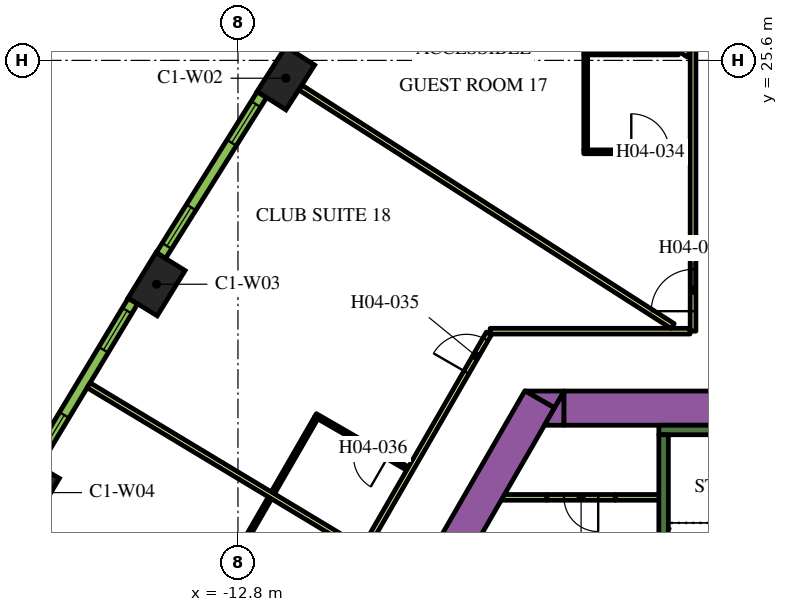
"""IFC4 building model, lengths in metres.
Left out: names, types, materials, properties, quantities, classifications, styles, units other than length and angle.
Written with IfcOpenShell. Run it as: python <this file> out.ifc"""

import sys

from ifc_helpers import new_model, si_unit, direction, frame, frame_2d, origin, origin_2d, place, context, subcontext, project, spatial, polyline, rectangle, outline, extrude, element, fill, save


model = new_model("IFC4")
c1 = context("Model", 3, precision=1e-05, world=origin(), true_north=direction((0.0, 1.0)))
c2 = subcontext(c1, "Body", "Model", "MODEL_VIEW")
j1 = project(units=[si_unit("LENGTHUNIT", "METRE"), si_unit("PLANEANGLEUNIT", "RADIAN")], contexts=[c1])
p1 = place(None, origin())
s1 = spatial("IfcSite", under=j1, at=p1, CompositionType="ELEMENT")
p2 = place(p1, origin())
s2 = spatial("IfcBuilding", under=s1, at=p2, CompositionType="ELEMENT")
p3 = place(p2, frame((0.0, 0.0, 70.5)))
s3 = spatial("IfcBuildingStorey", under=s2, at=p3, CompositionType="ELEMENT", Elevation=70.5)
for number, where, z_axis, x_axis in (
    (1, (-11.539, 25.131, 0.0), (0.0, 0.0, 1.0), (-0.539, -0.842, 0.0)),
    (2, (-14.942, 19.71, 0.0), (0.0, 0.0, 1.0), (-0.524, -0.852, 0.0)),
    (3, (-18.243, 14.228, 0.0), (0.0, 0.0, 1.0), (-0.508, -0.861, 0.0)),
):
    element("IfcColumn", number, at=place(p3, frame(where, z_axis=z_axis, x_axis=x_axis)), inside=s3, PredefinedType="COLUMN", context=c2, shape_type="SweptSolid", body=[
        extrude(rectangle(XDim=1.4, YDim=0.9, at=origin_2d()), origin(), (0.0, 0.0, 1.0), 3.9),
    ])
p4 = place(p3, frame((-15.36, -1.503, 0.0), z_axis=(0.0, 0.0, 1.0), x_axis=(0.50000389221, 0.866023156604, 0.0)))
e4 = element("IfcWall", 4, at=p4, inside=s3, PredefinedType="SOLIDWALL", context=c2, shape_type="SweptSolid", body=[
    extrude(rectangle(XDim=21.0, YDim=0.9, at=frame_2d((10.5, 0.0))), origin(), (0.0, 0.0, 1.0), 3.9),
])
p5 = place(p3, origin())
e5 = element("IfcWall", 5, at=p5, inside=s3, PredefinedType="SOLIDWALL", context=c2, shape_type="SweptSolid", body=[
    extrude(outline(polyline([(-4.215, 16.9), (-4.469, 16.46), (-5.231, 16.9), (-4.215, 16.9)])), origin(), (0.0, 0.0, 1.0), 3.9),
])
p6 = place(p3, frame((-4.224, 16.45, 0.0), z_axis=(0.0, 0.0, 1.0), x_axis=(1.0, 0.0, 0.0)))
e6 = element("IfcWall", 6, at=p6, inside=s3, PredefinedType="SOLIDWALL", context=c2, shape_type="SweptSolid", body=[
    extrude(rectangle(XDim=9.488, YDim=0.9, at=frame_2d((4.744, 0.0))), origin(), (0.0, 0.0, 1.0), 3.9),
])
e7 = element("IfcWall", 7, at=p5, inside=s3, PredefinedType="SOLIDWALL", context=c2, shape_type="SweptSolid", body=[
    extrude(outline(polyline([(-4.734, 16.0), (-4.226, 16.88), (-4.226, 16.0), (-4.734, 16.0)])), origin(), (0.0, 0.0, 1.0), 3.9),
])
p7 = place(p3, frame((-1.725, 15.875, 0.0), z_axis=(0.0, 0.0, 1.0), x_axis=(1.0, 0.0, 0.0)))
e8 = element("IfcWall", 8, at=p7, inside=s3, PredefinedType="SOLIDWALL", context=c2, shape_type="SweptSolid", body=[
    extrude(rectangle(XDim=3.45, YDim=0.25, at=frame_2d((1.725, 0.0))), origin(), (0.0, 0.0, 1.0), 3.9),
])
p8 = place(p3, frame((-1.6, 8.7, 0.0), z_axis=(0.0, 0.0, 1.0), x_axis=(0.0, 1.0, 0.0)))
e9 = element("IfcWall", 9, at=p8, inside=s3, PredefinedType="SOLIDWALL", context=c2, shape_type="SweptSolid", body=[
    extrude(rectangle(XDim=7.05, YDim=0.25, at=frame_2d((3.525, 0.0))), origin(), (0.0, 0.0, 1.0), 3.9),
])
p9 = place(p3, frame((-5.851, 14.102, 0.0), z_axis=(0.0, 0.0, 1.0), x_axis=(1.0, 0.0, 0.0)))
e10 = element("IfcWall", 10, at=p9, inside=s3, PredefinedType="PARTITIONING", context=c2, shape_type="SweptSolid", body=[
    extrude(rectangle(XDim=1.18, YDim=0.15, at=frame_2d((0.59, 0.0))), origin(), (0.0, 0.0, 1.0), 2.75),
])
p10 = place(p3, frame((-2.871, 14.102, 0.0), z_axis=(0.0, 0.0, 1.0), x_axis=(1.0, 0.0, 0.0)))
e11 = element("IfcWall", 11, at=p10, inside=s3, PredefinedType="PARTITIONING", context=c2, shape_type="SweptSolid", body=[
    extrude(rectangle(XDim=1.196, YDim=0.15, at=frame_2d((0.598, 0.0))), origin(), (0.0, 0.0, 1.0), 2.75),
])
p11 = place(p3, frame((-2.871, 14.102, 0.0), z_axis=(0.0, 0.0, 1.0), x_axis=(-1.0, 0.0, 0.0)))
e12 = element("IfcWall", 12, at=p11, inside=s3, PredefinedType="PARTITIONING", context=c2, shape_type="SweptSolid", body=[
    extrude(rectangle(XDim=1.8, YDim=0.15, at=frame_2d((0.9, 0.0))), origin(), (0.0, 0.0, 1.0), 2.75),
])
p12 = place(p11, frame((0.45, 0.0, 0.0)))
e13 = element("IfcOpeningElement", 13, at=p12, cuts=e12, PredefinedType="OPENING", context=c2, shape_type="SweptSolid", body=[
    extrude(rectangle(XDim=0.9, YDim=2.1, at=frame_2d((0.45, 1.05))), frame((0.0, 0.085, 0.0), z_axis=(0.0, -1.0, 0.0), x_axis=(1.0, 0.0, 0.0)), (0.0, 0.0, 1.0), 0.17),
])
p13 = place(p3, frame((-0.825, 18.475, 0.0), z_axis=(0.0, 0.0, 1.0), x_axis=(0.0, 1.0, 0.0)))
e14 = element("IfcWall", 14, at=p13, inside=s3, PredefinedType="PARTITIONING", context=c2, shape_type="SweptSolid", body=[
    extrude(rectangle(XDim=16.224, YDim=0.15, at=frame_2d((8.112, 0.0))), origin(), (0.0, 0.0, 1.0), 2.75),
])
p14 = place(p13, frame((7.949, 0.0, 0.0)))
e15 = element("IfcOpeningElement", 15, at=p14, cuts=e14, PredefinedType="OPENING", context=c2, shape_type="SweptSolid", body=[
    extrude(rectangle(XDim=1.0, YDim=2.1, at=frame_2d((0.5, 1.05))), frame((0.0, 0.085, 0.0), z_axis=(0.0, -1.0, 0.0), x_axis=(1.0, 0.0, 0.0)), (0.0, 0.0, 1.0), 0.17),
])
p15 = place(p13, frame((0.526, 0.0, 0.0)))
e16 = element("IfcOpeningElement", 16, at=p15, cuts=e14, PredefinedType="OPENING", context=c2, shape_type="SweptSolid", body=[
    extrude(rectangle(XDim=1.1, YDim=2.1, at=frame_2d((0.55, 1.05))), frame((0.0, 0.085, 0.0), z_axis=(0.0, -1.0, 0.0), x_axis=(1.0, 0.0, 0.0)), (0.0, 0.0, 1.0), 0.17),
])
p16 = place(p3, frame((-6.163, 18.475, 0.0), z_axis=(0.0, 0.0, 1.0), x_axis=(1.0, 0.0, 0.0)))
e17 = element("IfcWall", 17, at=p16, inside=s3, PredefinedType="PARTITIONING", context=c2, shape_type="SweptSolid", body=[
    extrude(rectangle(XDim=5.258, YDim=0.15, at=frame_2d((2.629, 0.0))), origin(), (0.0, 0.0, 1.0), 2.75),
])
p17 = place(p3, frame((-19.081, -3.9, 0.0), z_axis=(0.0, 0.0, 1.0), x_axis=(0.499998313975, 0.866026377209, 0.0)))
e18 = element("IfcWall", 18, at=p17, inside=s3, PredefinedType="PARTITIONING", context=c2, shape_type="SweptSolid", body=[
    extrude(rectangle(XDim=25.766, YDim=0.15, at=frame_2d((12.883, 0.0))), origin(), (0.0, 0.0, 1.0), 2.75),
])
p18 = place(p17, frame((24.586, 0.0, 0.0)))
e19 = element("IfcOpeningElement", 19, at=p18, cuts=e18, PredefinedType="OPENING", context=c2, shape_type="SweptSolid", body=[
    extrude(rectangle(XDim=1.0, YDim=2.1, at=frame_2d((0.5, 1.05))), frame((0.0, 0.085, 0.0), z_axis=(0.0, -1.0, 0.0), x_axis=(1.0, 0.0, 0.0)), (0.0, 0.0, 1.0), 0.17),
])
p19 = place(p17, frame((9.948, 0.0, 0.0)))
e20 = element("IfcOpeningElement", 20, at=p19, cuts=e18, PredefinedType="OPENING", context=c2, shape_type="SweptSolid", body=[
    extrude(rectangle(XDim=1.0, YDim=2.1, at=frame_2d((0.5, 1.05))), frame((0.0, 0.085, 0.0), z_axis=(0.0, -1.0, 0.0), x_axis=(1.0, 0.0, 0.0)), (0.0, 0.0, 1.0), 0.17),
])
p20 = place(p17, frame((7.782, 0.0, 0.0)))
e21 = element("IfcOpeningElement", 21, at=p20, cuts=e18, PredefinedType="OPENING", context=c2, shape_type="SweptSolid", body=[
    extrude(rectangle(XDim=0.9, YDim=2.1, at=frame_2d((0.45, 1.05))), frame((0.0, 0.085, 0.0), z_axis=(0.0, -1.0, 0.0), x_axis=(1.0, 0.0, 0.0)), (0.0, 0.0, 1.0), 0.17),
])
p21 = place(p17, frame((4.658, 0.0, 0.0)))
e22 = element("IfcOpeningElement", 22, at=p21, cuts=e18, PredefinedType="OPENING", context=c2, shape_type="SweptSolid", body=[
    extrude(rectangle(XDim=0.9, YDim=2.1, at=frame_2d((0.45, 1.05))), frame((0.0, 0.085, 0.0), z_axis=(0.0, -1.0, 0.0), x_axis=(1.0, 0.0, 0.0)), (0.0, 0.0, 1.0), 0.17),
])
p22 = place(p3, frame((-16.729, 17.052, 0.0), z_axis=(0.0, 0.0, 1.0), x_axis=(0.856630606266, -0.515930232113, 0.0)))
e23 = element("IfcWall", 23, at=p22, inside=s3, PredefinedType="PARTITIONING", context=c2, shape_type="SweptSolid", body=[
    extrude(rectangle(XDim=8.355, YDim=0.15, at=frame_2d((4.178, 0.0))), origin(), (0.0, 0.0, 1.0), 2.75),
])
p23 = place(p3, frame((-11.16, 24.888, 0.0), z_axis=(0.0, 0.0, 1.0), x_axis=(0.84199813156, -0.539480441211, 0.0)))
e24 = element("IfcWall", 24, at=p23, inside=s3, PredefinedType="PARTITIONING", context=c2, shape_type="SweptSolid", body=[
    extrude(rectangle(XDim=11.638, YDim=0.15, at=frame_2d((5.819, 0.0))), origin(), (0.0, 0.0, 1.0), 2.75),
])
p24 = place(p3, frame((-7.662, 30.238, 0.0), z_axis=(0.0, 0.0, 1.0), x_axis=(0.831882886825, -0.554951225431, 0.0)))
e25 = element("IfcWall", 25, at=p24, inside=s3, PredefinedType="PARTITIONING", context=c2, shape_type="SweptSolid", body=[
    extrude(rectangle(XDim=8.079, YDim=0.15, at=frame_2d((4.04, 0.0))), origin(), (0.0, 0.0, 1.0), 2.75),
])
p25 = place(p3, frame((-3.7, 23.195, 0.0), z_axis=(0.0, 0.0, 1.0), x_axis=(1.0, 0.0, 0.0)))
e26 = element("IfcWall", 26, at=p25, inside=s3, PredefinedType="PARTITIONING", context=c2, shape_type="SweptSolid", body=[
    extrude(rectangle(XDim=2.8, YDim=0.1, at=frame_2d((1.4, 0.0))), origin(), (0.0, 0.0, 1.0), 2.75),
])
p26 = place(p25, frame((1.25, 0.0, 0.0)))
e27 = element("IfcOpeningElement", 27, at=p26, cuts=e26, PredefinedType="OPENING", context=c2, shape_type="SweptSolid", body=[
    extrude(rectangle(XDim=1.0, YDim=2.1, at=frame_2d((0.5, 1.05))), frame((0.0, 0.06, 0.0), z_axis=(0.0, -1.0, 0.0), x_axis=(1.0, 0.0, 0.0)), (0.0, 0.0, 1.0), 0.12),
])
p27 = place(p3, frame((-3.65, 23.245, 0.0), z_axis=(0.0, 0.0, 1.0), x_axis=(0.0, 1.0, 0.0)))
e28 = element("IfcWall", 28, at=p27, inside=s3, PredefinedType="PARTITIONING", context=c2, shape_type="SweptSolid", body=[
    extrude(rectangle(XDim=2.5, YDim=0.1, at=frame_2d((1.25, 0.0))), origin(), (0.0, 0.0, 1.0), 2.75),
])
p28 = place(p3, frame((-1.21, 25.795, 0.0), z_axis=(0.0, 0.0, 1.0), x_axis=(-1.0, 0.0, 0.0)))
e29 = element("IfcWall", 29, at=p28, inside=s3, PredefinedType="PARTITIONING", context=c2, shape_type="SweptSolid", body=[
    extrude(rectangle(XDim=2.49, YDim=0.1, at=frame_2d((1.245, 0.0))), origin(), (0.0, 0.0, 1.0), 2.75),
])
p29 = place(p3, frame((-8.337, 14.861, 0.0), z_axis=(0.0, 0.0, 1.0), x_axis=(-0.866034573852, 0.49998411664, 0.0)))
e30 = element("IfcWall", 30, at=p29, inside=s3, PredefinedType="PARTITIONING", context=c2, shape_type="SweptSolid", body=[
    extrude(rectangle(XDim=2.8, YDim=0.1, at=frame_2d((1.4, 0.0))), origin(), (0.0, 0.0, 1.0), 2.75),
])
p30 = place(p29, frame((0.6, 0.0, 0.0)))
e31 = element("IfcOpeningElement", 31, at=p30, cuts=e30, PredefinedType="OPENING", context=c2, shape_type="SweptSolid", body=[
    extrude(rectangle(XDim=0.9, YDim=2.1, at=frame_2d((0.45, 1.05))), frame((0.0, 0.06, 0.0), z_axis=(0.0, -1.0, 0.0), x_axis=(1.0, 0.0, 0.0)), (0.0, 0.0, 1.0), 0.12),
])
p31 = place(p3, frame((-10.743, 16.192, 0.0), z_axis=(0.0, 0.0, 1.0), x_axis=(-0.500014167291, -0.866017224141, 0.0)))
e32 = element("IfcWall", 32, at=p31, inside=s3, PredefinedType="PARTITIONING", context=c2, shape_type="SweptSolid", body=[
    extrude(rectangle(XDim=2.27, YDim=0.1, at=frame_2d((1.135, 0.0))), origin(), (0.0, 0.0, 1.0), 2.75),
])
p32 = place(p3, frame((-13.147, 12.029, 0.0), z_axis=(0.0, 0.0, 1.0), x_axis=(0.499939447199, 0.866060361138, 0.0)))
e33 = element("IfcWall", 33, at=p32, inside=s3, PredefinedType="PARTITIONING", context=c2, shape_type="SweptSolid", body=[
    extrude(rectangle(XDim=2.37, YDim=0.1, at=frame_2d((1.185, 0.0))), origin(), (0.0, 0.0, 1.0), 2.75),
])
p33 = place(p3, frame((-8.676, 30.068, 0.0), z_axis=(0.0, 0.0, 1.0), x_axis=(-0.547204617628, -0.836998868845, 0.0)))
e34 = element("IfcWall", 34, at=p33, inside=s3, PredefinedType="SOLIDWALL", context=c2, shape_type="SweptSolid", body=[
    extrude(rectangle(XDim=4.998, YDim=0.29, at=frame_2d((2.499, 0.0))), origin(), (0.0, 0.0, 1.0), 3.65),
])
p34 = place(p33, frame((0.297, 0.0, 0.9)))
e35 = element("IfcOpeningElement", 35, at=p34, cuts=e34, PredefinedType="OPENING", context=c2, shape_type="SweptSolid", body=[
    extrude(rectangle(XDim=1.2, YDim=2.15, at=frame_2d((0.6, 1.075))), frame((0.0, 0.155, 0.0), z_axis=(0.0, -1.0, 0.0), x_axis=(1.0, 0.0, 0.0)), (0.0, 0.0, 1.0), 0.31),
])
p35 = place(p33, frame((3.501, 0.0, 0.9)))
e36 = element("IfcOpeningElement", 36, at=p35, cuts=e34, PredefinedType="OPENING", context=c2, shape_type="SweptSolid", body=[
    extrude(rectangle(XDim=1.2, YDim=2.15, at=frame_2d((0.6, 1.075))), frame((0.0, 0.155, 0.0), z_axis=(0.0, -1.0, 0.0), x_axis=(1.0, 0.0, 0.0)), (0.0, 0.0, 1.0), 0.31),
])
p36 = place(p3, frame((-12.17, 24.699, 0.0), z_axis=(0.0, 0.0, 1.0), x_axis=(-0.531688286542, -0.846940119462, 0.0)))
e37 = element("IfcWall", 37, at=p36, inside=s3, PredefinedType="SOLIDWALL", context=c2, shape_type="SweptSolid", body=[
    extrude(rectangle(XDim=4.998, YDim=0.29, at=frame_2d((2.499, 0.0))), origin(), (0.0, 0.0, 1.0), 3.65),
])
p37 = place(p36, frame((0.297, 0.0, 0.9)))
e38 = element("IfcOpeningElement", 38, at=p37, cuts=e37, PredefinedType="OPENING", context=c2, shape_type="SweptSolid", body=[
    extrude(rectangle(XDim=1.2, YDim=2.15, at=frame_2d((0.6, 1.075))), frame((0.0, 0.155, 0.0), z_axis=(0.0, -1.0, 0.0), x_axis=(1.0, 0.0, 0.0)), (0.0, 0.0, 1.0), 0.31),
])
p38 = place(p36, frame((3.501, 0.0, 0.9)))
e39 = element("IfcOpeningElement", 39, at=p38, cuts=e37, PredefinedType="OPENING", context=c2, shape_type="SweptSolid", body=[
    extrude(rectangle(XDim=1.2, YDim=2.15, at=frame_2d((0.6, 1.075))), frame((0.0, 0.155, 0.0), z_axis=(0.0, -1.0, 0.0), x_axis=(1.0, 0.0, 0.0)), (0.0, 0.0, 1.0), 0.31),
])
p39 = place(p3, frame((-15.564, 19.267, 0.0), z_axis=(0.0, 0.0, 1.0), x_axis=(-0.515938796285, -0.856625448191, 0.0)))
e40 = element("IfcWall", 40, at=p39, inside=s3, PredefinedType="SOLIDWALL", context=c2, shape_type="SweptSolid", body=[
    extrude(rectangle(XDim=4.998, YDim=0.29, at=frame_2d((2.499, 0.0))), origin(), (0.0, 0.0, 1.0), 3.65),
])
p40 = place(p39, frame((0.297, 0.0, 0.9)))
e41 = element("IfcOpeningElement", 41, at=p40, cuts=e40, PredefinedType="OPENING", context=c2, shape_type="SweptSolid", body=[
    extrude(rectangle(XDim=1.2, YDim=2.15, at=frame_2d((0.6, 1.075))), frame((0.0, 0.155, 0.0), z_axis=(0.0, -1.0, 0.0), x_axis=(1.0, 0.0, 0.0)), (0.0, 0.0, 1.0), 0.31),
])
p41 = place(p39, frame((3.501, 0.0, 0.9)))
e42 = element("IfcOpeningElement", 42, at=p41, cuts=e40, PredefinedType="OPENING", context=c2, shape_type="SweptSolid", body=[
    extrude(rectangle(XDim=1.2, YDim=2.15, at=frame_2d((0.6, 1.075))), frame((0.0, 0.155, 0.0), z_axis=(0.0, -1.0, 0.0), x_axis=(1.0, 0.0, 0.0)), (0.0, 0.0, 1.0), 0.31),
])
p42 = place(p12, origin())
e43 = element("IfcDoor", 43, at=p42, inside=s3, OperationType="SINGLE_SWING_LEFT", PredefinedType="DOOR", context=c2, shape_type="SweptSolid", body=[
    extrude(rectangle(XDim=0.9, YDim=2.1, at=frame_2d((0.45, 1.05))), frame((0.0, 0.025, 0.0), z_axis=(0.0, -1.0, 0.0), x_axis=(1.0, 0.0, 0.0)), (0.0, 0.0, 1.0), 0.05),
])
fill(e13, e43)
p43 = place(p15, origin())
e44 = element("IfcDoor", 44, at=p43, inside=s3, OperationType="SINGLE_SWING_LEFT", PredefinedType="DOOR", context=c2, shape_type="SweptSolid", body=[
    extrude(rectangle(XDim=1.1, YDim=2.1, at=frame_2d((0.55, 1.05))), frame((0.0, 0.025, 0.0), z_axis=(0.0, -1.0, 0.0), x_axis=(1.0, 0.0, 0.0)), (0.0, 0.0, 1.0), 0.05),
])
fill(e16, e44)
p44 = place(p26, origin())
e45 = element("IfcDoor", 45, at=p44, inside=s3, OperationType="SINGLE_SWING_LEFT", PredefinedType="DOOR", context=c2, shape_type="SweptSolid", body=[
    extrude(rectangle(XDim=1.0, YDim=2.1, at=frame_2d((0.5, 1.05))), frame((0.0, 0.025, 0.0), z_axis=(0.0, -1.0, 0.0), x_axis=(1.0, 0.0, 0.0)), (0.0, 0.0, 1.0), 0.05),
])
fill(e27, e45)
p45 = place(p18, origin())
e46 = element("IfcDoor", 46, at=p45, inside=s3, OperationType="SINGLE_SWING_RIGHT", PredefinedType="DOOR", context=c2, shape_type="SweptSolid", body=[
    extrude(rectangle(XDim=1.0, YDim=2.1, at=frame_2d((0.5, 1.05))), frame((0.0, 0.025, 0.0), z_axis=(0.0, -1.0, 0.0), x_axis=(1.0, 0.0, 0.0)), (0.0, 0.0, 1.0), 0.05),
])
fill(e19, e46)
p46 = place(p30, origin())
e47 = element("IfcDoor", 47, at=p46, inside=s3, OperationType="SINGLE_SWING_RIGHT", PredefinedType="DOOR", context=c2, shape_type="SweptSolid", body=[
    extrude(rectangle(XDim=0.9, YDim=2.1, at=frame_2d((0.45, 1.05))), frame((0.0, 0.025, 0.0), z_axis=(0.0, -1.0, 0.0), x_axis=(1.0, 0.0, 0.0)), (0.0, 0.0, 1.0), 0.05),
])
fill(e31, e47)
p47 = place(p37, origin())
e48 = element("IfcWindow", 48, at=p47, inside=s3, PartitioningType="DOUBLE_PANEL_VERTICAL", PredefinedType="WINDOW", context=c2, shape_type="SweptSolid", body=[
    extrude(rectangle(XDim=1.2, YDim=2.15, at=frame_2d((0.6, 1.075))), frame((0.0, 0.015, 0.0), z_axis=(0.0, -1.0, 0.0), x_axis=(1.0, 0.0, 0.0)), (0.0, 0.0, 1.0), 0.06),
])
fill(e38, e48)
p48 = place(p38, origin())
e49 = element("IfcWindow", 49, at=p48, inside=s3, PartitioningType="DOUBLE_PANEL_VERTICAL", PredefinedType="WINDOW", context=c2, shape_type="SweptSolid", body=[
    extrude(rectangle(XDim=1.2, YDim=2.15, at=frame_2d((0.6, 1.075))), frame((0.0, 0.015, 0.0), z_axis=(0.0, -1.0, 0.0), x_axis=(1.0, 0.0, 0.0)), (0.0, 0.0, 1.0), 0.06),
])
fill(e39, e49)
p49 = place(p40, origin())
e50 = element("IfcWindow", 50, at=p49, inside=s3, PartitioningType="DOUBLE_PANEL_VERTICAL", PredefinedType="WINDOW", context=c2, shape_type="SweptSolid", body=[
    extrude(rectangle(XDim=1.2, YDim=2.15, at=frame_2d((0.6, 1.075))), frame((0.0, 0.015, 0.0), z_axis=(0.0, -1.0, 0.0), x_axis=(1.0, 0.0, 0.0)), (0.0, 0.0, 1.0), 0.06),
])
fill(e41, e50)
p50 = place(p41, origin())
e51 = element("IfcWindow", 51, at=p50, inside=s3, PartitioningType="DOUBLE_PANEL_VERTICAL", PredefinedType="WINDOW", context=c2, shape_type="SweptSolid", body=[
    extrude(rectangle(XDim=1.2, YDim=2.15, at=frame_2d((0.6, 1.075))), frame((0.0, 0.015, 0.0), z_axis=(0.0, -1.0, 0.0), x_axis=(1.0, 0.0, 0.0)), (0.0, 0.0, 1.0), 0.06),
])
fill(e42, e51)
save(model, sys.argv[1])
